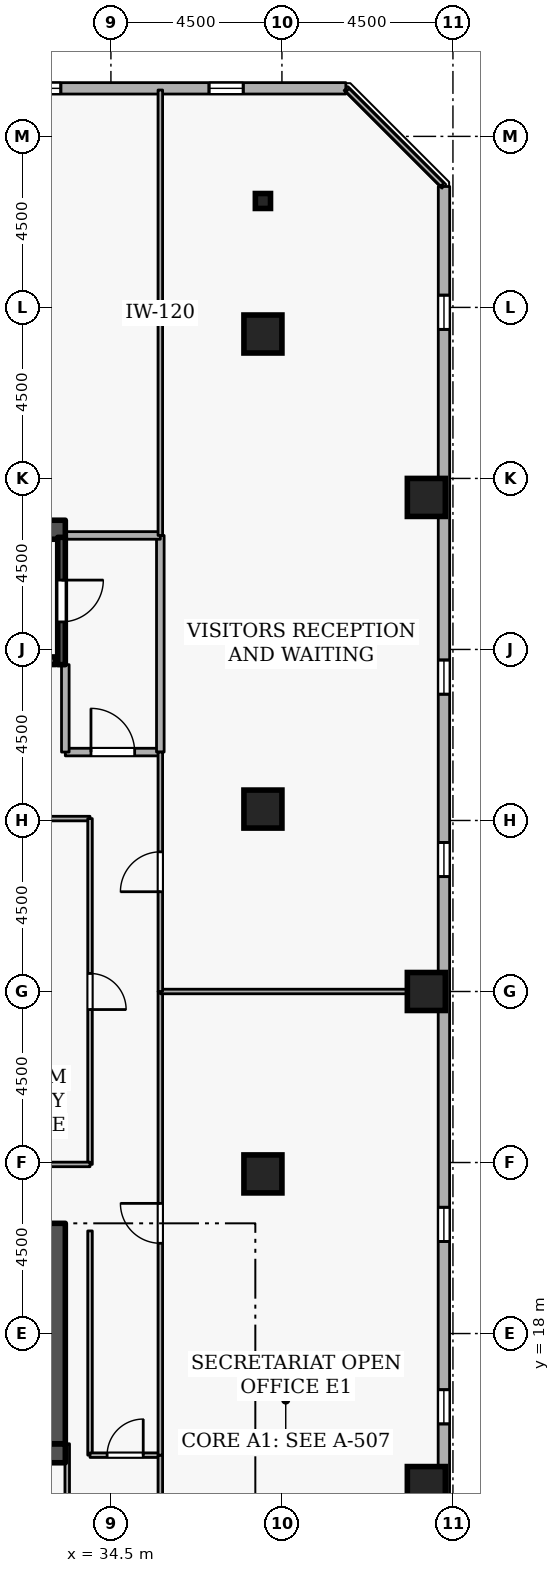
"""IFC4 building model, lengths in metres.
Left out: names, types, materials, properties, quantities, classifications, styles, units other than length and angle.
Written with IfcOpenShell. Run it as: python <this file> out.ifc"""

import sys

from ifc_helpers import new_model, si_unit, direction, frame, frame_2d, origin, origin_2d, place, context, subcontext, project, spatial, rectangle, i_section, extrude, element, fill, save


model = new_model("IFC4")
c1 = context("Model", 3, precision=1e-05, world=origin(), true_north=direction((0.0, 1.0)))
c2 = subcontext(c1, "Body", "Model", "MODEL_VIEW")
j1 = project(units=[si_unit("LENGTHUNIT", "METRE"), si_unit("PLANEANGLEUNIT", "RADIAN")], contexts=[c1])
p1 = place(None, origin())
s1 = spatial("IfcSite", under=j1, at=p1, CompositionType="ELEMENT")
p2 = place(p1, origin())
s2 = spatial("IfcBuilding", under=s1, at=p2, CompositionType="ELEMENT")
p3 = place(p2, frame((0.0, 0.0, 207.3)))
s3 = spatial("IfcBuildingStorey", under=s2, at=p3, CompositionType="ELEMENT", Elevation=207.3)
p4 = place(p3, frame((17.7, 14.85, 0.0), z_axis=(0.0, 0.0, 1.0), x_axis=(1.0, 0.0, 0.0)))
e1 = element("IfcWall", 1, at=p4, inside=s3, PredefinedType="SHEAR", context=c2, shape_type="SweptSolid", body=[
    extrude(rectangle(XDim=15.6, YDim=0.5, at=frame_2d((7.8, 0.0))), origin(), (0.0, 0.0, 1.0), 3.6),
])
p5 = place(p3, frame((33.05, 15.1, 0.0), z_axis=(0.0, 0.0, 1.0), x_axis=(0.0, 1.0, 0.0)))
e2 = element("IfcWall", 2, at=p5, inside=s3, PredefinedType="SHEAR", context=c2, shape_type="SweptSolid", body=[
    extrude(rectangle(XDim=5.8, YDim=0.5, at=frame_2d((2.9, 0.0))), origin(), (0.0, 0.0, 1.0), 3.6),
])
p6 = place(p3, frame((17.7, 39.15, 0.0), z_axis=(0.0, 0.0, 1.0), x_axis=(1.0, 0.0, 0.0)))
e3 = element("IfcWall", 3, at=p6, inside=s3, PredefinedType="SHEAR", context=c2, shape_type="SweptSolid", body=[
    extrude(rectangle(XDim=15.6, YDim=0.5, at=frame_2d((7.8, 0.0))), origin(), (0.0, 0.0, 1.0), 3.6),
])
for number, where, z_axis, x_axis in (
    (4, (42.8, 14.0, 0.0), (0.0, 0.0, 1.0), (1.0, 0.0, 0.0)),
    (5, (42.8, 27.0, 0.0), (0.0, 0.0, 1.0), (1.0, 0.0, 0.0)),
    (6, (42.8, 40.0, 0.0), (0.0, 0.0, 1.0), (1.0, 0.0, 0.0)),
    (7, (38.5, 44.3, 0.0), (0.0, 0.0, 1.0), (1.0, 0.0, 0.0)),
    (8, (38.5, 22.2, 0.0), (0.0, 0.0, 1.0), (1.0, 0.0, 0.0)),
    (9, (38.5, 31.8, 0.0), (0.0, 0.0, 1.0), (1.0, 0.0, 0.0)),
):
    element("IfcColumn", number, at=place(p3, frame(where, z_axis=z_axis, x_axis=x_axis)), inside=s3, PredefinedType="COLUMN", context=c2, shape_type="SweptSolid", body=[
        extrude(rectangle(XDim=1.0, YDim=1.0, at=origin_2d()), origin(), (0.0, 0.0, 1.0), 3.6),
    ])
p7 = place(p3, frame((38.5, 47.8, 0.0), z_axis=(0.0, 0.0, 1.0), x_axis=(1.0, 0.0, 0.0)))
e10 = element("IfcColumn", 10, at=p7, inside=s3, PredefinedType="COLUMN", context=c2, shape_type="SweptSolid", body=[
    extrude(i_section(OverallWidth=0.399, OverallDepth=0.394, WebThickness=0.023, FlangeThickness=0.037, FilletRadius=0.015, at=origin_2d()), origin(), (0.0, 0.0, 1.0), 3.6),
])
p8 = place(p3, frame((43.261, 12.922, 0.0), z_axis=(0.0, 0.0, 1.0), x_axis=(0.000103863011, 0.999999994606, 0.0)))
e11 = element("IfcWall", 11, at=p8, inside=s3, PredefinedType="STANDARD", context=c2, shape_type="SweptSolid", body=[
    extrude(rectangle(XDim=35.259, YDim=0.3, at=frame_2d((17.629, 0.0))), origin(), (0.0, 0.0, 1.0), 2.7),
])
p9 = place(p8, frame((2.7, 0.0, 0.72)))
e12 = element("IfcOpeningElement", 12, at=p9, cuts=e11, PredefinedType="OPENING", context=c2, shape_type="SweptSolid", body=[
    extrude(rectangle(XDim=0.9, YDim=1.75, at=frame_2d((0.45, 0.875))), frame((0.0, 0.16, 0.0), z_axis=(0.0, -1.0, 0.0), x_axis=(1.0, 0.0, 0.0)), (0.0, 0.0, 1.0), 0.32),
])
p10 = place(p8, frame((7.5, 0.0, 0.72)))
e13 = element("IfcOpeningElement", 13, at=p10, cuts=e11, PredefinedType="OPENING", context=c2, shape_type="SweptSolid", body=[
    extrude(rectangle(XDim=0.9, YDim=1.75, at=frame_2d((0.45, 0.875))), frame((0.0, 0.16, 0.0), z_axis=(0.0, -1.0, 0.0), x_axis=(1.0, 0.0, 0.0)), (0.0, 0.0, 1.0), 0.32),
])
p11 = place(p8, frame((17.1, 0.0, 0.72)))
e14 = element("IfcOpeningElement", 14, at=p11, cuts=e11, PredefinedType="OPENING", context=c2, shape_type="SweptSolid", body=[
    extrude(rectangle(XDim=0.9, YDim=1.75, at=frame_2d((0.45, 0.875))), frame((0.0, 0.16, 0.0), z_axis=(0.0, -1.0, 0.0), x_axis=(1.0, 0.0, 0.0)), (0.0, 0.0, 1.0), 0.32),
])
p12 = place(p8, frame((21.9, 0.0, 0.72)))
e15 = element("IfcOpeningElement", 15, at=p12, cuts=e11, PredefinedType="OPENING", context=c2, shape_type="SweptSolid", body=[
    extrude(rectangle(XDim=0.9, YDim=1.75, at=frame_2d((0.45, 0.875))), frame((0.0, 0.16, 0.0), z_axis=(0.0, -1.0, 0.0), x_axis=(1.0, 0.0, 0.0)), (0.0, 0.0, 1.0), 0.32),
])
p13 = place(p8, frame((31.5, 0.0, 0.72)))
e16 = element("IfcOpeningElement", 16, at=p13, cuts=e11, PredefinedType="OPENING", context=c2, shape_type="SweptSolid", body=[
    extrude(rectangle(XDim=0.9, YDim=1.75, at=frame_2d((0.45, 0.875))), frame((0.0, 0.16, 0.0), z_axis=(0.0, -1.0, 0.0), x_axis=(1.0, 0.0, 0.0)), (0.0, 0.0, 1.0), 0.32),
])
p14 = place(p3, frame((40.681, 50.765, 0.0), z_axis=(0.0, 0.0, 1.0), x_axis=(-0.999999994606, -0.000103863011, 0.0)))
e17 = element("IfcWall", 17, at=p14, inside=s3, PredefinedType="STANDARD", context=c2, shape_type="SweptSolid", body=[
    extrude(rectangle(XDim=35.259, YDim=0.3, at=frame_2d((17.629, 0.0))), origin(), (0.0, 0.0, 1.0), 2.7),
])
p15 = place(p14, frame((2.7, 0.0, 0.72)))
e18 = element("IfcOpeningElement", 18, at=p15, cuts=e17, PredefinedType="OPENING", context=c2, shape_type="SweptSolid", body=[
    extrude(rectangle(XDim=0.9, YDim=1.75, at=frame_2d((0.45, 0.875))), frame((0.0, 0.16, 0.0), z_axis=(0.0, -1.0, 0.0), x_axis=(1.0, 0.0, 0.0)), (0.0, 0.0, 1.0), 0.32),
])
p16 = place(p14, frame((7.5, 0.0, 0.72)))
e19 = element("IfcOpeningElement", 19, at=p16, cuts=e17, PredefinedType="OPENING", context=c2, shape_type="SweptSolid", body=[
    extrude(rectangle(XDim=0.9, YDim=1.75, at=frame_2d((0.45, 0.875))), frame((0.0, 0.16, 0.0), z_axis=(0.0, -1.0, 0.0), x_axis=(1.0, 0.0, 0.0)), (0.0, 0.0, 1.0), 0.32),
])
p17 = place(p14, frame((12.3, 0.0, 0.72)))
e20 = element("IfcOpeningElement", 20, at=p17, cuts=e17, PredefinedType="OPENING", context=c2, shape_type="SweptSolid", body=[
    extrude(rectangle(XDim=0.9, YDim=1.75, at=frame_2d((0.45, 0.875))), frame((0.0, 0.16, 0.0), z_axis=(0.0, -1.0, 0.0), x_axis=(1.0, 0.0, 0.0)), (0.0, 0.0, 1.0), 0.32),
])
p18 = place(p14, frame((17.1, 0.0, 0.72)))
e21 = element("IfcOpeningElement", 21, at=p18, cuts=e17, PredefinedType="OPENING", context=c2, shape_type="SweptSolid", body=[
    extrude(rectangle(XDim=0.9, YDim=1.75, at=frame_2d((0.45, 0.875))), frame((0.0, 0.16, 0.0), z_axis=(0.0, -1.0, 0.0), x_axis=(1.0, 0.0, 0.0)), (0.0, 0.0, 1.0), 0.32),
])
p19 = place(p14, frame((31.5, 0.0, 0.72)))
e22 = element("IfcOpeningElement", 22, at=p19, cuts=e17, PredefinedType="OPENING", context=c2, shape_type="SweptSolid", body=[
    extrude(rectangle(XDim=0.9, YDim=1.75, at=frame_2d((0.45, 0.875))), frame((0.0, 0.16, 0.0), z_axis=(0.0, -1.0, 0.0), x_axis=(1.0, 0.0, 0.0)), (0.0, 0.0, 1.0), 0.32),
])
p20 = place(p3, frame((33.2, 38.95, 0.0), z_axis=(0.0, 0.0, 1.0), x_axis=(0.0, -1.0, 0.0)))
e23 = element("IfcWall", 23, at=p20, inside=s3, PredefinedType="SHEAR", context=c2, shape_type="SweptSolid", body=[
    extrude(rectangle(XDim=3.35, YDim=0.2, at=frame_2d((1.675, 0.0))), origin(), (0.0, 0.0, 1.0), 3.6),
])
p21 = place(p20, frame((1.125, 0.0, 0.0)))
e24 = element("IfcOpeningElement", 24, at=p21, cuts=e23, PredefinedType="OPENING", context=c2, shape_type="SweptSolid", body=[
    extrude(rectangle(XDim=1.1, YDim=2.1, at=frame_2d((0.55, 1.05))), frame((0.0, 0.11, 0.0), z_axis=(0.0, -1.0, 0.0), x_axis=(1.0, 0.0, 0.0)), (0.0, 0.0, 1.0), 0.22),
])
p22 = place(p3, frame((25.95, 35.703, 0.0), z_axis=(0.0, 0.0, 1.0), x_axis=(1.0, 0.0, 0.0)))
e25 = element("IfcWall", 25, at=p22, inside=s3, PredefinedType="SHEAR", context=c2, shape_type="SweptSolid", body=[
    extrude(rectangle(XDim=7.1, YDim=0.2, at=frame_2d((3.55, 0.0))), origin(), (0.0, 0.0, 1.0), 3.6),
])
p23 = place(p3, frame((33.3, 33.3, 0.0), z_axis=(0.0, 0.0, 1.0), x_axis=(1.0, 0.0, 0.0)))
e26 = element("IfcWall", 26, at=p23, inside=s3, PredefinedType="STANDARD", context=c2, shape_type="SweptSolid", body=[
    extrude(rectangle(XDim=2.5, YDim=0.2, at=frame_2d((1.25, 0.0))), origin(), (0.0, 0.0, 1.0), 3.34),
])
p24 = place(p23, frame((0.675, 0.0, 0.0)))
e27 = element("IfcOpeningElement", 27, at=p24, cuts=e26, PredefinedType="OPENING", context=c2, shape_type="SweptSolid", body=[
    extrude(rectangle(XDim=1.15, YDim=2.1, at=frame_2d((0.575, 1.05))), frame((0.0, 0.11, 0.0), z_axis=(0.0, -1.0, 0.0), x_axis=(1.0, 0.0, 0.0)), (0.0, 0.0, 1.0), 0.22),
])
p25 = place(p3, frame((35.8, 33.3, 0.0), z_axis=(0.0, 0.0, 1.0), x_axis=(0.0, 1.0, 0.0)))
e28 = element("IfcWall", 28, at=p25, inside=s3, PredefinedType="STANDARD", context=c2, shape_type="SweptSolid", body=[
    extrude(rectangle(XDim=5.7, YDim=0.2, at=frame_2d((2.85, 0.0))), origin(), (0.0, 0.0, 1.0), 3.34),
])
p26 = place(p3, frame((35.8, 39.0, 0.0), z_axis=(0.0, 0.0, 1.0), x_axis=(-1.0, 0.0, 0.0)))
e29 = element("IfcWall", 29, at=p26, inside=s3, PredefinedType="STANDARD", context=c2, shape_type="SweptSolid", body=[
    extrude(rectangle(XDim=2.5, YDim=0.2, at=frame_2d((1.25, 0.0))), origin(), (0.0, 0.0, 1.0), 3.34),
])
p27 = place(p3, frame((33.3, 35.6, 0.0), z_axis=(0.0, 0.0, 1.0), x_axis=(0.0, -1.0, 0.0)))
e30 = element("IfcWall", 30, at=p27, inside=s3, PredefinedType="STANDARD", context=c2, shape_type="SweptSolid", body=[
    extrude(rectangle(XDim=2.3, YDim=0.2, at=frame_2d((1.15, 0.0))), origin(), (0.0, 0.0, 1.0), 2.545),
])
p28 = place(p3, frame((33.95, 20.7, 0.0), z_axis=(0.0, 0.0, 1.0), x_axis=(0.0, -1.0, 0.0)))
e31 = element("IfcWall", 31, at=p28, inside=s3, PredefinedType="PARTITIONING", context=c2, shape_type="SweptSolid", body=[
    extrude(rectangle(XDim=5.9, YDim=0.12, at=frame_2d((2.95, 0.0))), origin(), (0.0, 0.0, 1.0), 3.34),
])
p29 = place(p3, frame((33.95, 14.8, 0.0), z_axis=(0.0, 0.0, 1.0), x_axis=(1.0, 0.0, 0.0)))
e32 = element("IfcWall", 32, at=p29, inside=s3, PredefinedType="PARTITIONING", context=c2, shape_type="SweptSolid", body=[
    extrude(rectangle(XDim=1.85, YDim=0.12, at=frame_2d((0.925, 0.0))), origin(), (0.0, 0.0, 1.0), 3.34),
])
p30 = place(p29, frame((0.45, 0.0, 0.0)))
e33 = element("IfcOpeningElement", 33, at=p30, cuts=e32, PredefinedType="OPENING", context=c2, shape_type="SweptSolid", body=[
    extrude(rectangle(XDim=0.95, YDim=2.1, at=frame_2d((0.475, 1.05))), frame((0.0, 0.07, 0.0), z_axis=(0.0, -1.0, 0.0), x_axis=(1.0, 0.0, 0.0)), (0.0, 0.0, 1.0), 0.14),
])
p31 = place(p3, frame((35.8, 14.8, 0.0), z_axis=(0.0, 0.0, 1.0), x_axis=(0.0, -1.0, 0.0)))
e34 = element("IfcWall", 34, at=p31, inside=s3, PredefinedType="PARTITIONING", context=c2, shape_type="SweptSolid", body=[
    extrude(rectangle(XDim=5.52, YDim=0.12, at=frame_2d((2.76, 0.0))), origin(), (0.0, 0.0, 1.0), 3.34),
])
p32 = place(p3, frame((33.35, 9.28, 0.0), z_axis=(0.0, 0.0, 1.0), x_axis=(0.0, 1.0, 0.0)))
e35 = element("IfcWall", 35, at=p32, inside=s3, PredefinedType="PARTITIONING", context=c2, shape_type="SweptSolid", body=[
    extrude(rectangle(XDim=5.82, YDim=0.12, at=frame_2d((2.91, 0.0))), origin(), (0.0, 0.0, 1.0), 2.545),
])
p33 = place(p3, frame((35.8, 14.8, 0.0), z_axis=(0.0, 0.0, 1.0), x_axis=(0.0, 1.0, 0.0)))
e36 = element("IfcWall", 36, at=p33, inside=s3, PredefinedType="PARTITIONING", context=c2, shape_type="SweptSolid", body=[
    extrude(rectangle(XDim=12.2, YDim=0.12, at=frame_2d((6.1, 0.0))), origin(), (0.0, 0.0, 1.0), 3.34),
])
p34 = place(p33, frame((5.575, 0.0, 0.0)))
e37 = element("IfcOpeningElement", 37, at=p34, cuts=e36, PredefinedType="OPENING", context=c2, shape_type="SweptSolid", body=[
    extrude(rectangle(XDim=1.05, YDim=2.1, at=frame_2d((0.525, 1.05))), frame((0.0, 0.07, 0.0), z_axis=(0.0, -1.0, 0.0), x_axis=(1.0, 0.0, 0.0)), (0.0, 0.0, 1.0), 0.14),
])
p35 = place(p3, frame((35.8, 27.0, 0.0), z_axis=(0.0, 0.0, 1.0), x_axis=(1.0, 0.0, 0.0)))
e38 = element("IfcWall", 38, at=p35, inside=s3, PredefinedType="PARTITIONING", context=c2, shape_type="SweptSolid", body=[
    extrude(rectangle(XDim=7.42, YDim=0.12, at=frame_2d((3.71, 0.0))), origin(), (0.0, 0.0, 1.0), 2.932),
])
p36 = place(p3, frame((35.8, 39.0, 0.0), z_axis=(0.0, 0.0, 1.0), x_axis=(0.0, 1.0, 0.0)))
e39 = element("IfcWall", 39, at=p36, inside=s3, PredefinedType="PARTITIONING", context=c2, shape_type="SweptSolid", body=[
    extrude(rectangle(XDim=11.72, YDim=0.12, at=frame_2d((5.86, 0.0))), origin(), (0.0, 0.0, 1.0), 3.34),
])
p37 = place(p3, frame((40.725, 50.72, 0.0), z_axis=(0.0, 0.0, 1.0), x_axis=(0.707106781187, -0.707106781187, 0.0)))
e40 = element("IfcWall", 40, at=p37, inside=s3, PredefinedType="PARTITIONING", context=c2, shape_type="SweptSolid", body=[
    extrude(rectangle(XDim=3.528, YDim=0.12, at=frame_2d((1.764, 0.0))), origin(), (0.0, 0.0, 1.0), 3.34),
])
p38 = place(p3, frame((35.8, 27.0, 0.0), z_axis=(0.0, 0.0, 1.0), x_axis=(0.0, 1.0, 0.0)))
e41 = element("IfcWall", 41, at=p38, inside=s3, PredefinedType="PARTITIONING", context=c2, shape_type="SweptSolid", body=[
    extrude(rectangle(XDim=6.3, YDim=0.12, at=frame_2d((3.15, 0.0))), origin(), (0.0, 0.0, 1.0), 3.34),
])
p39 = place(p38, frame((2.625, 0.0, 0.0)))
e42 = element("IfcOpeningElement", 42, at=p39, cuts=e41, PredefinedType="OPENING", context=c2, shape_type="SweptSolid", body=[
    extrude(rectangle(XDim=1.05, YDim=2.1, at=frame_2d((0.525, 1.05))), frame((0.0, 0.07, 0.0), z_axis=(0.0, -1.0, 0.0), x_axis=(1.0, 0.0, 0.0)), (0.0, 0.0, 1.0), 0.14),
])
p40 = place(p3, frame((30.7, 31.55, 0.0), z_axis=(0.0, 0.0, 1.0), x_axis=(1.0, 0.0, 0.0)))
e43 = element("IfcWall", 43, at=p40, inside=s3, PredefinedType="PARTITIONING", context=c2, shape_type="SweptSolid", body=[
    extrude(rectangle(XDim=3.25, YDim=0.12, at=frame_2d((1.625, 0.0))), origin(), (0.0, 0.0, 1.0), 3.34),
])
p41 = place(p3, frame((33.95, 31.55, 0.0), z_axis=(0.0, 0.0, 1.0), x_axis=(0.0, -1.0, 0.0)))
e44 = element("IfcWall", 44, at=p41, inside=s3, PredefinedType="PARTITIONING", context=c2, shape_type="SweptSolid", body=[
    extrude(rectangle(XDim=9.1, YDim=0.12, at=frame_2d((4.55, 0.0))), origin(), (0.0, 0.0, 1.0), 3.34),
])
p42 = place(p41, frame((4.075, 0.0, 0.0)))
e45 = element("IfcOpeningElement", 45, at=p42, cuts=e44, PredefinedType="OPENING", context=c2, shape_type="SweptSolid", body=[
    extrude(rectangle(XDim=0.95, YDim=2.1, at=frame_2d((0.475, 1.05))), frame((0.0, 0.07, 0.0), z_axis=(0.0, -1.0, 0.0), x_axis=(1.0, 0.0, 0.0)), (0.0, 0.0, 1.0), 0.14),
])
p43 = place(p3, frame((33.95, 22.45, 0.0), z_axis=(0.0, 0.0, 1.0), x_axis=(-1.0, 0.0, 0.0)))
e46 = element("IfcWall", 46, at=p43, inside=s3, PredefinedType="PARTITIONING", context=c2, shape_type="SweptSolid", body=[
    extrude(rectangle(XDim=3.25, YDim=0.12, at=frame_2d((1.625, 0.0))), origin(), (0.0, 0.0, 1.0), 3.34),
])
p44 = place(p9, origin())
e47 = element("IfcWindow", 47, at=p44, inside=s3, PartitioningType="SINGLE_PANEL", PredefinedType="WINDOW", context=c2, shape_type="SweptSolid", body=[
    extrude(rectangle(XDim=0.9, YDim=1.75, at=frame_2d((0.45, 0.875))), frame((0.0, 0.03, 0.0), z_axis=(0.0, -1.0, 0.0), x_axis=(1.0, 0.0, 0.0)), (0.0, 0.0, 1.0), 0.06),
])
fill(e12, e47)
p45 = place(p10, origin())
e48 = element("IfcWindow", 48, at=p45, inside=s3, PartitioningType="SINGLE_PANEL", PredefinedType="WINDOW", context=c2, shape_type="SweptSolid", body=[
    extrude(rectangle(XDim=0.9, YDim=1.75, at=frame_2d((0.45, 0.875))), frame((0.0, 0.03, 0.0), z_axis=(0.0, -1.0, 0.0), x_axis=(1.0, 0.0, 0.0)), (0.0, 0.0, 1.0), 0.06),
])
fill(e13, e48)
p46 = place(p11, origin())
e49 = element("IfcWindow", 49, at=p46, inside=s3, PartitioningType="SINGLE_PANEL", PredefinedType="WINDOW", context=c2, shape_type="SweptSolid", body=[
    extrude(rectangle(XDim=0.9, YDim=1.75, at=frame_2d((0.45, 0.875))), frame((0.0, 0.03, 0.0), z_axis=(0.0, -1.0, 0.0), x_axis=(1.0, 0.0, 0.0)), (0.0, 0.0, 1.0), 0.06),
])
fill(e14, e49)
p47 = place(p12, origin())
e50 = element("IfcWindow", 50, at=p47, inside=s3, PartitioningType="SINGLE_PANEL", PredefinedType="WINDOW", context=c2, shape_type="SweptSolid", body=[
    extrude(rectangle(XDim=0.9, YDim=1.75, at=frame_2d((0.45, 0.875))), frame((0.0, 0.03, 0.0), z_axis=(0.0, -1.0, 0.0), x_axis=(1.0, 0.0, 0.0)), (0.0, 0.0, 1.0), 0.06),
])
fill(e15, e50)
p48 = place(p13, origin())
e51 = element("IfcWindow", 51, at=p48, inside=s3, PartitioningType="SINGLE_PANEL", PredefinedType="WINDOW", context=c2, shape_type="SweptSolid", body=[
    extrude(rectangle(XDim=0.9, YDim=1.75, at=frame_2d((0.45, 0.875))), frame((0.0, 0.03, 0.0), z_axis=(0.0, -1.0, 0.0), x_axis=(1.0, 0.0, 0.0)), (0.0, 0.0, 1.0), 0.06),
])
fill(e16, e51)
p49 = place(p15, origin())
e52 = element("IfcWindow", 52, at=p49, inside=s3, PartitioningType="SINGLE_PANEL", PredefinedType="WINDOW", context=c2, shape_type="SweptSolid", body=[
    extrude(rectangle(XDim=0.9, YDim=1.75, at=frame_2d((0.45, 0.875))), frame((0.0, 0.03, 0.0), z_axis=(0.0, -1.0, 0.0), x_axis=(1.0, 0.0, 0.0)), (0.0, 0.0, 1.0), 0.06),
])
fill(e18, e52)
p50 = place(p16, origin())
e53 = element("IfcWindow", 53, at=p50, inside=s3, PartitioningType="SINGLE_PANEL", PredefinedType="WINDOW", context=c2, shape_type="SweptSolid", body=[
    extrude(rectangle(XDim=0.9, YDim=1.75, at=frame_2d((0.45, 0.875))), frame((0.0, 0.03, 0.0), z_axis=(0.0, -1.0, 0.0), x_axis=(1.0, 0.0, 0.0)), (0.0, 0.0, 1.0), 0.06),
])
fill(e19, e53)
p51 = place(p21, origin())
e54 = element("IfcDoor", 54, at=p51, inside=s3, OperationType="SINGLE_SWING_LEFT", PredefinedType="DOOR", context=c2, shape_type="SweptSolid", body=[
    extrude(rectangle(XDim=1.1, YDim=2.1, at=frame_2d((0.55, 1.05))), frame((0.0, 0.025, 0.0), z_axis=(0.0, -1.0, 0.0), x_axis=(1.0, 0.0, 0.0)), (0.0, 0.0, 1.0), 0.05),
])
fill(e24, e54)
p52 = place(p24, origin())
e55 = element("IfcDoor", 55, at=p52, inside=s3, OperationType="SINGLE_SWING_LEFT", PredefinedType="DOOR", context=c2, shape_type="SweptSolid", body=[
    extrude(rectangle(XDim=1.15, YDim=2.1, at=frame_2d((0.575, 1.05))), frame((0.0, 0.025, 0.0), z_axis=(0.0, -1.0, 0.0), x_axis=(1.0, 0.0, 0.0)), (0.0, 0.0, 1.0), 0.05),
])
fill(e27, e55)
p53 = place(p30, origin())
e56 = element("IfcDoor", 56, at=p53, inside=s3, OperationType="SINGLE_SWING_RIGHT", PredefinedType="DOOR", context=c2, shape_type="SweptSolid", body=[
    extrude(rectangle(XDim=0.95, YDim=2.1, at=frame_2d((0.475, 1.05))), frame((0.0, 0.025, 0.0), z_axis=(0.0, -1.0, 0.0), x_axis=(1.0, 0.0, 0.0)), (0.0, 0.0, 1.0), 0.05),
])
fill(e33, e56)
p54 = place(p34, origin())
e57 = element("IfcDoor", 57, at=p54, inside=s3, OperationType="SINGLE_SWING_RIGHT", PredefinedType="DOOR", context=c2, shape_type="SweptSolid", body=[
    extrude(rectangle(XDim=1.05, YDim=2.1, at=frame_2d((0.525, 1.05))), frame((0.0, 0.025, 0.0), z_axis=(0.0, -1.0, 0.0), x_axis=(1.0, 0.0, 0.0)), (0.0, 0.0, 1.0), 0.05),
])
fill(e37, e57)
p55 = place(p39, origin())
e58 = element("IfcDoor", 58, at=p55, inside=s3, OperationType="SINGLE_SWING_LEFT", PredefinedType="DOOR", context=c2, shape_type="SweptSolid", body=[
    extrude(rectangle(XDim=1.05, YDim=2.1, at=frame_2d((0.525, 1.05))), frame((0.0, 0.025, 0.0), z_axis=(0.0, -1.0, 0.0), x_axis=(1.0, 0.0, 0.0)), (0.0, 0.0, 1.0), 0.05),
])
fill(e42, e58)
p56 = place(p42, origin())
e59 = element("IfcDoor", 59, at=p56, inside=s3, OperationType="SINGLE_SWING_RIGHT", PredefinedType="DOOR", context=c2, shape_type="SweptSolid", body=[
    extrude(rectangle(XDim=0.95, YDim=2.1, at=frame_2d((0.475, 1.05))), frame((0.0, 0.025, 0.0), z_axis=(0.0, -1.0, 0.0), x_axis=(1.0, 0.0, 0.0)), (0.0, 0.0, 1.0), 0.05),
])
fill(e45, e59)
save(model, sys.argv[1])
